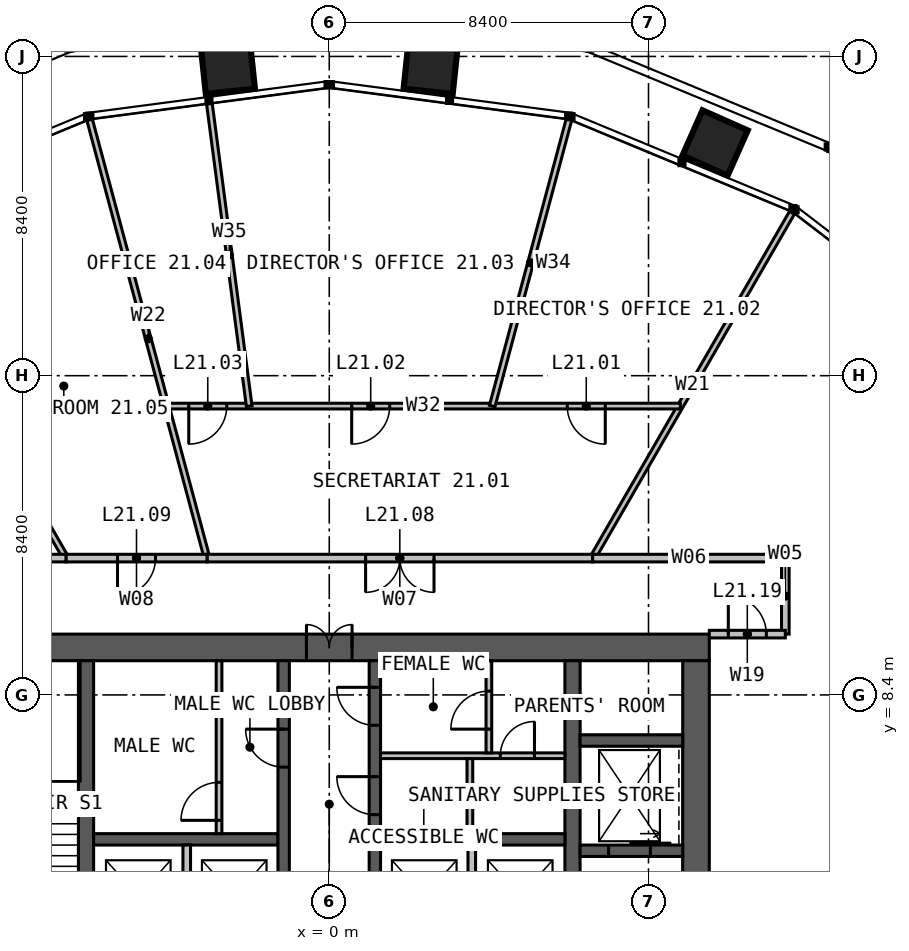
"""IFC4 building model, lengths in metres.
Left out: names, types, materials, properties, quantities, classifications, styles, units other than length and angle.
Written with IfcOpenShell. Run it as: python <this file> out.ifc"""

import sys

from ifc_helpers import new_model, si_unit, direction, frame, frame_2d, origin, place, context, subcontext, project, spatial, rectangle, extrude, element, fill, save


model = new_model("IFC4")
c1 = context("Model", 3, precision=1e-05, world=origin(), true_north=direction((0.0, 1.0)))
c2 = subcontext(c1, "Body", "Model", "MODEL_VIEW")
j1 = project(units=[si_unit("LENGTHUNIT", "METRE"), si_unit("PLANEANGLEUNIT", "RADIAN")], contexts=[c1])
p1 = place(None, origin())
s1 = spatial("IfcSite", under=j1, at=p1, CompositionType="ELEMENT")
p2 = place(p1, origin())
s2 = spatial("IfcBuilding", under=s1, at=p2, CompositionType="ELEMENT")
p3 = place(p2, frame((0.0, 0.0, 90.0)))
s3 = spatial("IfcBuildingStorey", under=s2, at=p3, CompositionType="ELEMENT", Elevation=90.0)
p4 = place(p3, frame((-10.0, 9.65, 0.0), z_axis=(0.0, 0.0, 1.0), x_axis=(1.0, 0.0, 0.0)))
e1 = element("IfcWall", 1, at=p4, inside=s3, PredefinedType="SOLIDWALL", context=c2, shape_type="SweptSolid", body=[
    extrude(rectangle(XDim=20.0, YDim=0.7, at=frame_2d((10.0, 0.0))), origin(), (0.0, 0.0, 1.0), 4.0),
])
p5 = place(p4, frame((9.4, 0.0, 0.0)))
e2 = element("IfcOpeningElement", 2, at=p5, cuts=e1, PredefinedType="OPENING", context=c2, shape_type="SweptSolid", body=[
    extrude(rectangle(XDim=1.2, YDim=2.2, at=frame_2d((0.6, 1.1))), frame((0.0, 0.36, 0.0), z_axis=(0.0, -1.0, 0.0), x_axis=(1.0, 0.0, 0.0)), (0.0, 0.0, 1.0), 0.72),
])
p6 = place(p3, frame((9.65, -9.3, 0.0), z_axis=(0.0, 0.0, 1.0), x_axis=(0.0, 1.0, 0.0)))
e3 = element("IfcWall", 3, at=p6, inside=s3, PredefinedType="SOLIDWALL", context=c2, shape_type="SweptSolid", body=[
    extrude(rectangle(XDim=18.6, YDim=0.7, at=frame_2d((9.3, 0.0))), origin(), (0.0, 0.0, 1.0), 4.0),
])
p7 = place(p3, frame((-6.4, -9.3, 0.0), z_axis=(0.0, 0.0, 1.0), x_axis=(0.0, 1.0, 0.0)))
e4 = element("IfcWall", 4, at=p7, inside=s3, PredefinedType="SOLIDWALL", context=c2, shape_type="SweptSolid", body=[
    extrude(rectangle(XDim=18.6, YDim=0.4, at=frame_2d((9.3, 0.0))), origin(), (0.0, 0.0, 1.0), 4.0),
])
p8 = place(p7, frame((8.8, 0.0, 0.0)))
e5 = element("IfcOpeningElement", 5, at=p8, cuts=e4, PredefinedType="OPENING", context=c2, shape_type="SweptSolid", body=[
    extrude(rectangle(XDim=1.0, YDim=2.2, at=frame_2d((0.5, 1.1))), frame((0.0, 0.21, 0.0), z_axis=(0.0, -1.0, 0.0), x_axis=(1.0, 0.0, 0.0)), (0.0, 0.0, 1.0), 0.42),
])
p9 = place(p3, frame((6.4, 9.3, 0.0), z_axis=(0.0, 0.0, 1.0), x_axis=(0.0, -1.0, 0.0)))
e6 = element("IfcWall", 6, at=p9, inside=s3, PredefinedType="SOLIDWALL", context=c2, shape_type="SweptSolid", body=[
    extrude(rectangle(XDim=18.6, YDim=0.4, at=frame_2d((9.3, 0.0))), origin(), (0.0, 0.0, 1.0), 4.0),
])
p10 = place(p9, frame((8.8, 0.0, 0.0)))
e7 = element("IfcOpeningElement", 7, at=p10, cuts=e6, PredefinedType="OPENING", context=c2, shape_type="SweptSolid", body=[
    extrude(rectangle(XDim=1.0, YDim=2.2, at=frame_2d((0.5, 1.1))), frame((0.0, 0.21, 0.0), z_axis=(0.0, -1.0, 0.0), x_axis=(1.0, 0.0, 0.0)), (0.0, 0.0, 1.0), 0.42),
])
for number, where, z_axis, x_axis in (
    (8, (-6.2, 4.6, 0.0), (0.0, 0.0, 1.0), (1.0, 0.0, 0.0)),
    (9, (1.35, 4.6, 0.0), (0.0, 0.0, 1.0), (1.0, 0.0, 0.0)),
):
    element("IfcWall", number, at=place(p3, frame(where, z_axis=z_axis, x_axis=x_axis)), inside=s3, PredefinedType="SOLIDWALL", context=c2, shape_type="SweptSolid", body=[
        extrude(rectangle(XDim=4.85, YDim=0.3, at=frame_2d((2.425, 0.0))), origin(), (0.0, 0.0, 1.0), 4.0),
    ])
p11 = place(p3, frame((-1.2, 1.45, 0.0), z_axis=(0.0, 0.0, 1.0), x_axis=(0.0, 1.0, 0.0)))
e10 = element("IfcWall", 10, at=p11, inside=s3, PredefinedType="SOLIDWALL", context=c2, shape_type="SweptSolid", body=[
    extrude(rectangle(XDim=7.85, YDim=0.3, at=frame_2d((3.925, 0.0))), origin(), (0.0, 0.0, 1.0), 4.0),
])
p12 = place(p11, frame((5.05, 0.0, 0.0)))
e11 = element("IfcOpeningElement", 11, at=p12, cuts=e10, PredefinedType="OPENING", context=c2, shape_type="SweptSolid", body=[
    extrude(rectangle(XDim=1.0, YDim=2.2, at=frame_2d((0.5, 1.1))), frame((0.0, 0.16, 0.0), z_axis=(0.0, -1.0, 0.0), x_axis=(1.0, 0.0, 0.0)), (0.0, 0.0, 1.0), 0.32),
])
p13 = place(p3, frame((1.2, 1.45, 0.0), z_axis=(0.0, 0.0, 1.0), x_axis=(0.0, 1.0, 0.0)))
e12 = element("IfcWall", 12, at=p13, inside=s3, PredefinedType="SOLIDWALL", context=c2, shape_type="SweptSolid", body=[
    extrude(rectangle(XDim=7.85, YDim=0.3, at=frame_2d((3.925, 0.0))), origin(), (0.0, 0.0, 1.0), 4.0),
])
p14 = place(p13, frame((3.8, 0.0, 0.0)))
e13 = element("IfcOpeningElement", 13, at=p14, cuts=e12, PredefinedType="OPENING", context=c2, shape_type="SweptSolid", body=[
    extrude(rectangle(XDim=1.0, YDim=2.2, at=frame_2d((0.5, 1.1))), frame((0.0, 0.16, 0.0), z_axis=(0.0, -1.0, 0.0), x_axis=(1.0, 0.0, 0.0)), (0.0, 0.0, 1.0), 0.32),
])
p15 = place(p13, frame((6.15, 0.0, 0.0)))
e14 = element("IfcOpeningElement", 14, at=p15, cuts=e12, PredefinedType="OPENING", context=c2, shape_type="SweptSolid", body=[
    extrude(rectangle(XDim=1.0, YDim=2.2, at=frame_2d((0.5, 1.1))), frame((0.0, 0.16, 0.0), z_axis=(0.0, -1.0, 0.0), x_axis=(1.0, 0.0, 0.0)), (0.0, 0.0, 1.0), 0.32),
])
p16 = place(p3, frame((6.6, 4.3, 0.0), z_axis=(0.0, 0.0, 1.0), x_axis=(1.0, 0.0, 0.0)))
e15 = element("IfcWall", 15, at=p16, inside=s3, PredefinedType="SOLIDWALL", context=c2, shape_type="SweptSolid", body=[
    extrude(rectangle(XDim=2.7, YDim=0.3, at=frame_2d((1.35, 0.0))), origin(), (0.0, 0.0, 1.0), 4.0),
])
p17 = place(p16, frame((0.75, 0.0, 0.0)))
e16 = element("IfcOpeningElement", 16, at=p17, cuts=e15, PredefinedType="OPENING", context=c2, shape_type="SweptSolid", body=[
    extrude(rectangle(XDim=1.1, YDim=2.2, at=frame_2d((0.55, 1.1))), frame((0.0, 0.16, 0.0), z_axis=(0.0, -1.0, 0.0), x_axis=(1.0, 0.0, 0.0)), (0.0, 0.0, 1.0), 0.32),
])
p18 = place(p3, frame((6.6, 7.2, 0.0), z_axis=(0.0, 0.0, 1.0), x_axis=(1.0, 0.0, 0.0)))
e17 = element("IfcWall", 17, at=p18, inside=s3, PredefinedType="SOLIDWALL", context=c2, shape_type="SweptSolid", body=[
    extrude(rectangle(XDim=2.7, YDim=0.3, at=frame_2d((1.35, 0.0))), origin(), (0.0, 0.0, 1.0), 4.0),
])
for number, where, z_axis, x_axis in (
    (18, (-3.75, 1.75, 0.0), (0.0, 0.0, 1.0), (0.0, 1.0, 0.0)),
    (19, (3.75, 1.75, 0.0), (0.0, 0.0, 1.0), (0.0, 1.0, 0.0)),
):
    element("IfcWall", number, at=place(p3, frame(where, z_axis=z_axis, x_axis=x_axis)), inside=s3, PredefinedType="SOLIDWALL", context=c2, shape_type="SweptSolid", body=[
        extrude(rectangle(XDim=2.7, YDim=0.2, at=frame_2d((1.35, 0.0))), origin(), (0.0, 0.0, 1.0), 3.75),
    ])
p19 = place(p3, frame((1.35, 6.8, 0.0), z_axis=(0.0, 0.0, 1.0), x_axis=(1.0, 0.0, 0.0)))
e20 = element("IfcWall", 20, at=p19, inside=s3, PredefinedType="PARTITIONING", context=c2, shape_type="SweptSolid", body=[
    extrude(rectangle(XDim=4.85, YDim=0.15, at=frame_2d((2.425, 0.0))), origin(), (0.0, 0.0, 1.0), 3.75),
])
p20 = place(p19, frame((3.15, 0.0, 0.0)))
e21 = element("IfcOpeningElement", 21, at=p20, cuts=e20, PredefinedType="OPENING", context=c2, shape_type="SweptSolid", body=[
    extrude(rectangle(XDim=0.9, YDim=2.2, at=frame_2d((0.45, 1.1))), frame((0.0, 0.085, 0.0), z_axis=(0.0, -1.0, 0.0), x_axis=(1.0, 0.0, 0.0)), (0.0, 0.0, 1.0), 0.17),
])
p21 = place(p3, frame((3.7, 4.75, 0.0), z_axis=(0.0, 0.0, 1.0), x_axis=(0.0, 1.0, 0.0)))
e22 = element("IfcWall", 22, at=p21, inside=s3, PredefinedType="PARTITIONING", context=c2, shape_type="SweptSolid", body=[
    extrude(rectangle(XDim=1.975, YDim=0.15, at=frame_2d((0.988, 0.0))), origin(), (0.0, 0.0, 1.0), 3.75),
])
p22 = place(p3, frame((4.2, 6.875, 0.0), z_axis=(0.0, 0.0, 1.0), x_axis=(0.0, 1.0, 0.0)))
e23 = element("IfcWall", 23, at=p22, inside=s3, PredefinedType="PARTITIONING", context=c2, shape_type="SweptSolid", body=[
    extrude(rectangle(XDim=2.425, YDim=0.15, at=frame_2d((1.212, 0.0))), origin(), (0.0, 0.0, 1.0), 3.75),
])
p23 = place(p22, frame((0.625, 0.0, 0.0)))
e24 = element("IfcOpeningElement", 24, at=p23, cuts=e23, PredefinedType="OPENING", context=c2, shape_type="SweptSolid", body=[
    extrude(rectangle(XDim=1.0, YDim=2.2, at=frame_2d((0.5, 1.1))), frame((0.0, 0.085, 0.0), z_axis=(0.0, -1.0, 0.0), x_axis=(1.0, 0.0, 0.0)), (0.0, 0.0, 1.0), 0.17),
])
p24 = place(p3, frame((-2.9, 4.75, 0.0), z_axis=(0.0, 0.0, 1.0), x_axis=(0.0, 1.0, 0.0)))
e25 = element("IfcWall", 25, at=p24, inside=s3, PredefinedType="PARTITIONING", context=c2, shape_type="SweptSolid", body=[
    extrude(rectangle(XDim=4.55, YDim=0.15, at=frame_2d((2.275, 0.0))), origin(), (0.0, 0.0, 1.0), 3.75),
])
p25 = place(p24, frame((0.35, 0.0, 0.0)))
e26 = element("IfcOpeningElement", 26, at=p25, cuts=e25, PredefinedType="OPENING", context=c2, shape_type="SweptSolid", body=[
    extrude(rectangle(XDim=1.0, YDim=2.2, at=frame_2d((0.5, 1.1))), frame((0.0, 0.085, 0.0), z_axis=(0.0, -1.0, 0.0), x_axis=(1.0, 0.0, 0.0)), (0.0, 0.0, 1.0), 0.17),
])
p26 = place(p3, frame((6.928, 12.0, 0.0), z_axis=(0.0, 0.0, 1.0), x_axis=(0.499995153367, 0.866028201971, 0.0)))
e27 = element("IfcWall", 27, at=p26, inside=s3, PredefinedType="PARTITIONING", context=c2, shape_type="SweptSolid", body=[
    extrude(rectangle(XDim=10.514, YDim=0.15, at=frame_2d((5.257, 0.0))), origin(), (0.0, 0.0, 1.0), 2.89),
])
p27 = place(p3, frame((-3.215, 12.0, 0.0), z_axis=(0.0, 0.0, 1.0), x_axis=(-0.258816099716, 0.965926615498, 0.0)))
e28 = element("IfcWall", 28, at=p27, inside=s3, PredefinedType="PARTITIONING", context=c2, shape_type="SweptSolid", body=[
    extrude(rectangle(XDim=11.947, YDim=0.15, at=frame_2d((5.973, 0.0))), origin(), (0.0, 0.0, 1.0), 2.89),
])
p28 = place(p3, frame((-6.928, 12.0, 0.0), z_axis=(0.0, 0.0, 1.0), x_axis=(-0.499995153367, 0.866028201971, 0.0)))
e29 = element("IfcWall", 29, at=p28, inside=s3, PredefinedType="PARTITIONING", context=c2, shape_type="SweptSolid", body=[
    extrude(rectangle(XDim=10.514, YDim=0.15, at=frame_2d((5.257, 0.0))), origin(), (0.0, 0.0, 1.0), 2.89),
])
p29 = place(p3, frame((12.0, 10.0, 0.0), z_axis=(0.0, 0.0, 1.0), x_axis=(0.0, 1.0, 0.0)))
e30 = element("IfcWall", 30, at=p29, inside=s3, PredefinedType="PARTITIONING", context=c2, shape_type="SweptSolid", body=[
    extrude(rectangle(XDim=2.0, YDim=0.2, at=frame_2d((1.0, 0.0))), origin(), (0.0, 0.0, 1.0), 3.8),
])
p30 = place(p3, frame((12.0, 12.0, 0.0), z_axis=(0.0, 0.0, 1.0), x_axis=(-1.0, 0.0, 0.0)))
e31 = element("IfcWall", 31, at=p30, inside=s3, PredefinedType="PARTITIONING", context=c2, shape_type="SweptSolid", body=[
    extrude(rectangle(XDim=5.072, YDim=0.2, at=frame_2d((2.536, 0.0))), origin(), (0.0, 0.0, 1.0), 3.8),
])
p31 = place(p3, frame((9.238, 16.0, 0.0), z_axis=(0.0, 0.0, 1.0), x_axis=(-1.0, 0.0, 0.0)))
e32 = element("IfcWall", 32, at=p31, inside=s3, PredefinedType="PARTITIONING", context=c2, shape_type="SweptSolid", body=[
    extrude(rectangle(XDim=13.525, YDim=0.15, at=frame_2d((6.762, 0.0))), origin(), (0.0, 0.0, 1.0), 2.89),
])
p32 = place(p31, frame((1.975, 0.0, 0.0)))
e33 = element("IfcOpeningElement", 33, at=p32, cuts=e32, PredefinedType="OPENING", context=c2, shape_type="SweptSolid", body=[
    extrude(rectangle(XDim=1.0, YDim=2.2, at=frame_2d((0.5, 1.1))), frame((0.0, 0.085, 0.0), z_axis=(0.0, -1.0, 0.0), x_axis=(1.0, 0.0, 0.0)), (0.0, 0.0, 1.0), 0.17),
])
p33 = place(p31, frame((7.647, 0.0, 0.0)))
e34 = element("IfcOpeningElement", 34, at=p33, cuts=e32, PredefinedType="OPENING", context=c2, shape_type="SweptSolid", body=[
    extrude(rectangle(XDim=1.0, YDim=2.2, at=frame_2d((0.5, 1.1))), frame((0.0, 0.085, 0.0), z_axis=(0.0, -1.0, 0.0), x_axis=(1.0, 0.0, 0.0)), (0.0, 0.0, 1.0), 0.17),
])
p34 = place(p31, frame((11.934, 0.0, 0.0)))
e35 = element("IfcOpeningElement", 35, at=p34, cuts=e32, PredefinedType="OPENING", context=c2, shape_type="SweptSolid", body=[
    extrude(rectangle(XDim=1.0, YDim=2.2, at=frame_2d((0.5, 1.1))), frame((0.0, 0.085, 0.0), z_axis=(0.0, -1.0, 0.0), x_axis=(1.0, 0.0, 0.0)), (0.0, 0.0, 1.0), 0.17),
])
p35 = place(p3, frame((4.287, 16.0, 0.0), z_axis=(0.0, 0.0, 1.0), x_axis=(0.258816859097, 0.965926412025, 0.0)))
e36 = element("IfcWall", 36, at=p35, inside=s3, PredefinedType="PARTITIONING", context=c2, shape_type="SweptSolid", body=[
    extrude(rectangle(XDim=7.806, YDim=0.15, at=frame_2d((3.903, 0.0))), origin(), (0.0, 0.0, 1.0), 2.89),
])
p36 = place(p3, frame((-2.106, 16.0, 0.0), z_axis=(0.0, 0.0, 1.0), x_axis=(-0.130533221372, 0.991443935943, 0.0)))
e37 = element("IfcWall", 37, at=p36, inside=s3, PredefinedType="PARTITIONING", context=c2, shape_type="SweptSolid", body=[
    extrude(rectangle(XDim=8.024, YDim=0.15, at=frame_2d((4.012, 0.0))), origin(), (0.0, 0.0, 1.0), 2.79),
])
p37 = place(p3, frame((6.928, 12.0, 0.0), z_axis=(0.0, 0.0, 1.0), x_axis=(-1.0, 0.0, 0.0)))
e38 = element("IfcWall", 38, at=p37, inside=s3, PredefinedType="PARTITIONING", context=c2, shape_type="SweptSolid", body=[
    extrude(rectangle(XDim=10.144, YDim=0.2, at=frame_2d((5.072, 0.0))), origin(), (0.0, 0.0, 1.0), 3.8),
])
p38 = place(p37, frame((4.172, 0.0, 0.0)))
e39 = element("IfcOpeningElement", 39, at=p38, cuts=e38, PredefinedType="OPENING", context=c2, shape_type="SweptSolid", body=[
    extrude(rectangle(XDim=1.8, YDim=2.2, at=frame_2d((0.9, 1.1))), frame((0.0, 0.11, 0.0), z_axis=(0.0, -1.0, 0.0), x_axis=(1.0, 0.0, 0.0)), (0.0, 0.0, 1.0), 0.22),
])
p39 = place(p3, frame((-3.215, 12.0, 0.0), z_axis=(0.0, 0.0, 1.0), x_axis=(-1.0, 0.0, 0.0)))
e40 = element("IfcWall", 40, at=p39, inside=s3, PredefinedType="PARTITIONING", context=c2, shape_type="SweptSolid", body=[
    extrude(rectangle(XDim=3.713, YDim=0.2, at=frame_2d((1.856, 0.0))), origin(), (0.0, 0.0, 1.0), 3.8),
])
p40 = place(p39, frame((1.356, 0.0, 0.0)))
e41 = element("IfcOpeningElement", 41, at=p40, cuts=e40, PredefinedType="OPENING", context=c2, shape_type="SweptSolid", body=[
    extrude(rectangle(XDim=1.0, YDim=2.2, at=frame_2d((0.5, 1.1))), frame((0.0, 0.11, 0.0), z_axis=(0.0, -1.0, 0.0), x_axis=(1.0, 0.0, 0.0)), (0.0, 0.0, 1.0), 0.22),
])
p41 = place(p3, frame((-6.928, 12.0, 0.0), z_axis=(0.0, 0.0, 1.0), x_axis=(-1.0, 0.0, 0.0)))
e42 = element("IfcWall", 42, at=p41, inside=s3, PredefinedType="PARTITIONING", context=c2, shape_type="SweptSolid", body=[
    extrude(rectangle(XDim=5.072, YDim=0.2, at=frame_2d((2.536, 0.0))), origin(), (0.0, 0.0, 1.0), 3.8),
])
p42 = place(p41, frame((2.036, 0.0, 0.0)))
e43 = element("IfcOpeningElement", 43, at=p42, cuts=e42, PredefinedType="OPENING", context=c2, shape_type="SweptSolid", body=[
    extrude(rectangle(XDim=1.0, YDim=2.2, at=frame_2d((0.5, 1.1))), frame((0.0, 0.11, 0.0), z_axis=(0.0, -1.0, 0.0), x_axis=(1.0, 0.0, 0.0)), (0.0, 0.0, 1.0), 0.22),
])
p43 = place(p3, frame((10.0, 10.0, 0.0), z_axis=(0.0, 0.0, 1.0), x_axis=(1.0, 0.0, 0.0)))
e44 = element("IfcWall", 44, at=p43, inside=s3, PredefinedType="PARTITIONING", context=c2, shape_type="SweptSolid", body=[
    extrude(rectangle(XDim=2.0, YDim=0.2, at=frame_2d((1.0, 0.0))), origin(), (0.0, 0.0, 1.0), 3.8),
])
p44 = place(p43, frame((0.5, 0.0, 0.0)))
e45 = element("IfcOpeningElement", 45, at=p44, cuts=e44, PredefinedType="OPENING", context=c2, shape_type="SweptSolid", body=[
    extrude(rectangle(XDim=1.0, YDim=2.2, at=frame_2d((0.5, 1.1))), frame((0.0, 0.11, 0.0), z_axis=(0.0, -1.0, 0.0), x_axis=(1.0, 0.0, 0.0)), (0.0, 0.0, 1.0), 0.22),
])
p45 = place(p5, origin())
e46 = element("IfcDoor", 46, at=p45, inside=s3, OperationType="DOUBLE_DOOR_SINGLE_SWING", PredefinedType="DOOR", context=c2, shape_type="SweptSolid", body=[
    extrude(rectangle(XDim=1.2, YDim=2.2, at=frame_2d((0.6, 1.1))), frame((0.0, 0.025, 0.0), z_axis=(0.0, -1.0, 0.0), x_axis=(1.0, 0.0, 0.0)), (0.0, 0.0, 1.0), 0.05),
])
fill(e2, e46)
p46 = place(p12, origin())
e47 = element("IfcDoor", 47, at=p46, inside=s3, OperationType="SINGLE_SWING_RIGHT", PredefinedType="DOOR", context=c2, shape_type="SweptSolid", body=[
    extrude(rectangle(XDim=1.0, YDim=2.2, at=frame_2d((0.5, 1.1))), frame((0.0, 0.025, 0.0), z_axis=(0.0, -1.0, 0.0), x_axis=(1.0, 0.0, 0.0)), (0.0, 0.0, 1.0), 0.05),
])
fill(e11, e47)
p47 = place(p14, origin())
e48 = element("IfcDoor", 48, at=p47, inside=s3, OperationType="SINGLE_SWING_RIGHT", PredefinedType="DOOR", context=c2, shape_type="SweptSolid", body=[
    extrude(rectangle(XDim=1.0, YDim=2.2, at=frame_2d((0.5, 1.1))), frame((0.0, 0.025, 0.0), z_axis=(0.0, -1.0, 0.0), x_axis=(1.0, 0.0, 0.0)), (0.0, 0.0, 1.0), 0.05),
])
fill(e13, e48)
p48 = place(p15, origin())
e49 = element("IfcDoor", 49, at=p48, inside=s3, OperationType="SINGLE_SWING_RIGHT", PredefinedType="DOOR", context=c2, shape_type="SweptSolid", body=[
    extrude(rectangle(XDim=1.0, YDim=2.2, at=frame_2d((0.5, 1.1))), frame((0.0, 0.025, 0.0), z_axis=(0.0, -1.0, 0.0), x_axis=(1.0, 0.0, 0.0)), (0.0, 0.0, 1.0), 0.05),
])
fill(e14, e49)
p49 = place(p20, origin())
e50 = element("IfcDoor", 50, at=p49, inside=s3, OperationType="SINGLE_SWING_RIGHT", PredefinedType="DOOR", context=c2, shape_type="SweptSolid", body=[
    extrude(rectangle(XDim=0.9, YDim=2.2, at=frame_2d((0.45, 1.1))), frame((0.0, 0.025, 0.0), z_axis=(0.0, -1.0, 0.0), x_axis=(1.0, 0.0, 0.0)), (0.0, 0.0, 1.0), 0.05),
])
fill(e21, e50)
p50 = place(p23, origin())
e51 = element("IfcDoor", 51, at=p50, inside=s3, OperationType="SINGLE_SWING_LEFT", PredefinedType="DOOR", context=c2, shape_type="SweptSolid", body=[
    extrude(rectangle(XDim=1.0, YDim=2.2, at=frame_2d((0.5, 1.1))), frame((0.0, 0.025, 0.0), z_axis=(0.0, -1.0, 0.0), x_axis=(1.0, 0.0, 0.0)), (0.0, 0.0, 1.0), 0.05),
])
fill(e24, e51)
p51 = place(p25, origin())
e52 = element("IfcDoor", 52, at=p51, inside=s3, OperationType="SINGLE_SWING_LEFT", PredefinedType="DOOR", context=c2, shape_type="SweptSolid", body=[
    extrude(rectangle(XDim=1.0, YDim=2.2, at=frame_2d((0.5, 1.1))), frame((0.0, 0.025, 0.0), z_axis=(0.0, -1.0, 0.0), x_axis=(1.0, 0.0, 0.0)), (0.0, 0.0, 1.0), 0.05),
])
fill(e26, e52)
p52 = place(p17, origin())
e53 = element("IfcDoor", 53, at=p52, inside=s3, OperationType="SLIDING_TO_LEFT", PredefinedType="DOOR", context=c2, shape_type="SweptSolid", body=[
    extrude(rectangle(XDim=1.1, YDim=2.2, at=frame_2d((0.55, 1.1))), frame((0.0, 0.025, 0.0), z_axis=(0.0, -1.0, 0.0), x_axis=(1.0, 0.0, 0.0)), (0.0, 0.0, 1.0), 0.05),
])
fill(e16, e53)
p53 = place(p32, origin())
e54 = element("IfcDoor", 54, at=p53, inside=s3, OperationType="SINGLE_SWING_LEFT", PredefinedType="DOOR", context=c2, shape_type="SweptSolid", body=[
    extrude(rectangle(XDim=1.0, YDim=2.2, at=frame_2d((0.5, 1.1))), frame((0.0, 0.025, 0.0), z_axis=(0.0, -1.0, 0.0), x_axis=(1.0, 0.0, 0.0)), (0.0, 0.0, 1.0), 0.05),
])
fill(e33, e54)
p54 = place(p33, origin())
e55 = element("IfcDoor", 55, at=p54, inside=s3, OperationType="SINGLE_SWING_RIGHT", PredefinedType="DOOR", context=c2, shape_type="SweptSolid", body=[
    extrude(rectangle(XDim=1.0, YDim=2.2, at=frame_2d((0.5, 1.1))), frame((0.0, 0.025, 0.0), z_axis=(0.0, -1.0, 0.0), x_axis=(1.0, 0.0, 0.0)), (0.0, 0.0, 1.0), 0.05),
])
fill(e34, e55)
p55 = place(p34, origin())
e56 = element("IfcDoor", 56, at=p55, inside=s3, OperationType="SINGLE_SWING_RIGHT", PredefinedType="DOOR", context=c2, shape_type="SweptSolid", body=[
    extrude(rectangle(XDim=1.0, YDim=2.2, at=frame_2d((0.5, 1.1))), frame((0.0, 0.025, 0.0), z_axis=(0.0, -1.0, 0.0), x_axis=(1.0, 0.0, 0.0)), (0.0, 0.0, 1.0), 0.05),
])
fill(e35, e56)
p56 = place(p38, origin())
e57 = element("IfcDoor", 57, at=p56, inside=s3, OperationType="DOUBLE_DOOR_SINGLE_SWING", PredefinedType="DOOR", context=c2, shape_type="SweptSolid", body=[
    extrude(rectangle(XDim=1.8, YDim=2.2, at=frame_2d((0.9, 1.1))), frame((0.0, 0.025, 0.0), z_axis=(0.0, -1.0, 0.0), x_axis=(1.0, 0.0, 0.0)), (0.0, 0.0, 1.0), 0.05),
])
fill(e39, e57)
p57 = place(p40, origin())
e58 = element("IfcDoor", 58, at=p57, inside=s3, OperationType="SINGLE_SWING_RIGHT", PredefinedType="DOOR", context=c2, shape_type="SweptSolid", body=[
    extrude(rectangle(XDim=1.0, YDim=2.2, at=frame_2d((0.5, 1.1))), frame((0.0, 0.025, 0.0), z_axis=(0.0, -1.0, 0.0), x_axis=(1.0, 0.0, 0.0)), (0.0, 0.0, 1.0), 0.05),
])
fill(e41, e58)
p58 = place(p44, origin())
e59 = element("IfcDoor", 59, at=p58, inside=s3, OperationType="SINGLE_SWING_LEFT", PredefinedType="DOOR", context=c2, shape_type="SweptSolid", body=[
    extrude(rectangle(XDim=1.0, YDim=2.2, at=frame_2d((0.5, 1.1))), frame((0.0, 0.025, 0.0), z_axis=(0.0, -1.0, 0.0), x_axis=(1.0, 0.0, 0.0)), (0.0, 0.0, 1.0), 0.05),
])
fill(e45, e59)
save(model, sys.argv[1])
